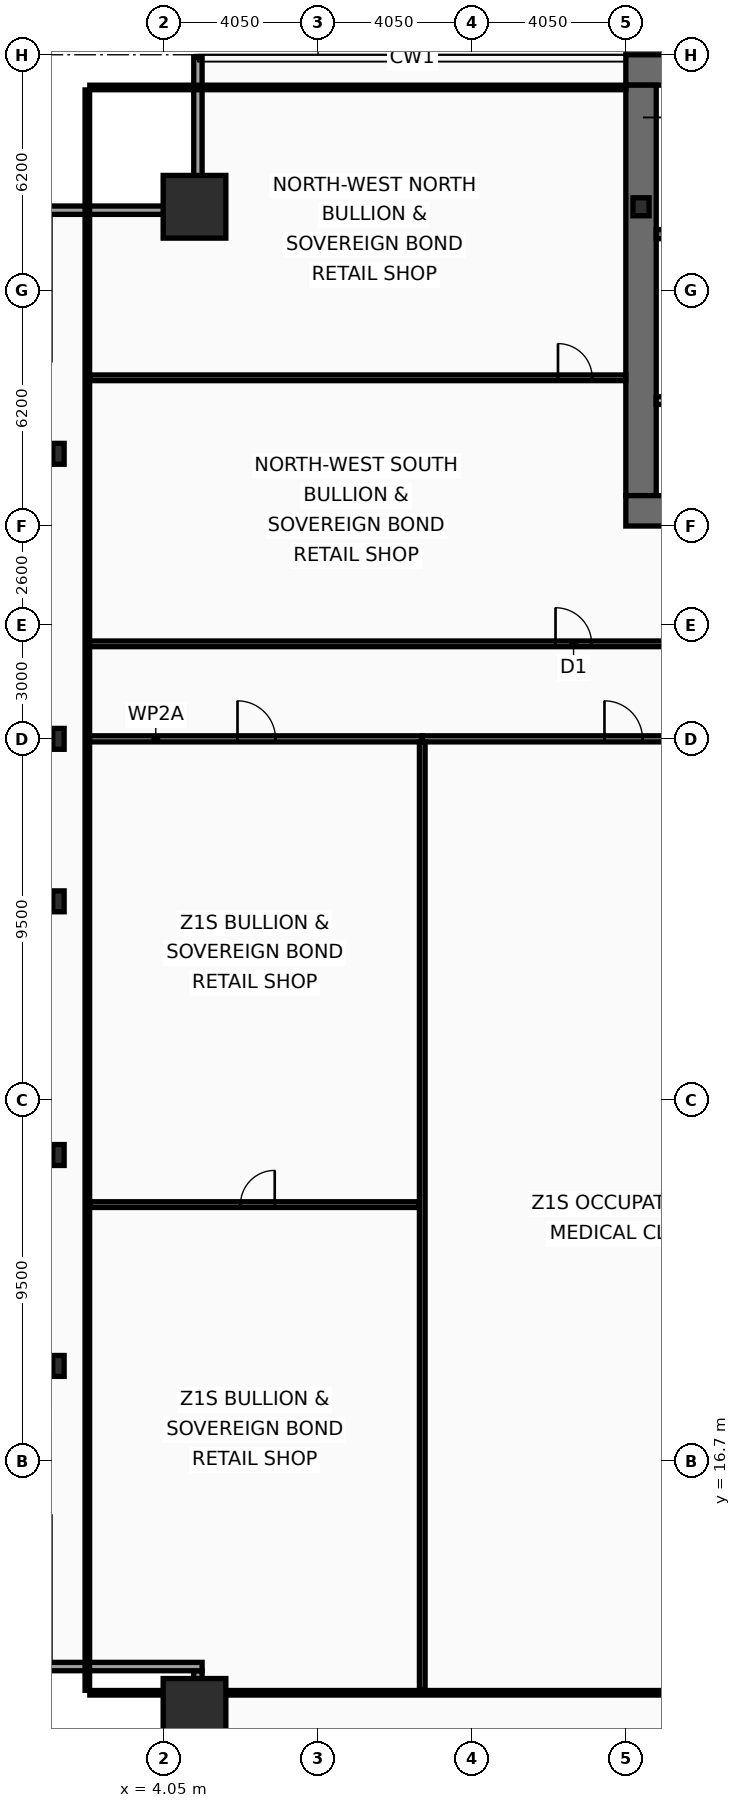
"""IFC4 building model, lengths in metres.
Left out: names, types, materials, properties, quantities, classifications, styles, units other than length and angle.
Written with IfcOpenShell. Run it as: python <this file> out.ifc"""

import sys

from ifc_helpers import new_model, si_unit, direction, frame, frame_2d, origin, origin_2d, place, context, subcontext, project, spatial, rectangle, hollow_rectangle, i_section, extrude, element, fill, save


model = new_model("IFC4")
c1 = context("Model", 3, precision=1e-05, world=origin(), true_north=direction((0.0, 1.0)))
c2 = subcontext(c1, "Body", "Model", "MODEL_VIEW")
j1 = project(units=[si_unit("LENGTHUNIT", "METRE"), si_unit("PLANEANGLEUNIT", "RADIAN")], contexts=[c1])
p1 = place(None, origin())
s1 = spatial("IfcSite", under=j1, at=p1, CompositionType="ELEMENT")
p2 = place(p1, origin())
s2 = spatial("IfcBuilding", under=s1, at=p2, CompositionType="ELEMENT")
p3 = place(p2, frame((0.0, 0.0, 61.8)))
s3 = spatial("IfcBuildingStorey", under=s2, at=p3, CompositionType="ELEMENT", Elevation=61.8)
p4 = place(p3, frame((16.2, 53.3, 0.0), z_axis=(0.0, 0.0, 1.0), x_axis=(1.0, 0.0, 0.0)))
e1 = element("IfcWall", 1, at=p4, inside=s3, PredefinedType="SHEAR", context=c2, shape_type="SweptSolid", body=[
    extrude(rectangle(XDim=40.5, YDim=0.8, at=frame_2d((20.25, 0.0))), origin(), (0.0, 0.0, 1.0), 3.82),
])
p5 = place(p3, frame((16.6, 42.1, 0.0), z_axis=(0.0, 0.0, 1.0), x_axis=(0.0, 1.0, 0.0)))
e2 = element("IfcWall", 2, at=p5, inside=s3, PredefinedType="SHEAR", context=c2, shape_type="SweptSolid", body=[
    extrude(rectangle(XDim=10.8, YDim=0.8, at=frame_2d((5.4, 0.0))), origin(), (0.0, 0.0, 1.0), 3.82),
])
p6 = place(p3, frame((18.65, 41.7, 0.0), z_axis=(0.0, 0.0, 1.0), x_axis=(-1.0, 0.0, 0.0)))
e3 = element("IfcWall", 3, at=p6, inside=s3, PredefinedType="SHEAR", context=c2, shape_type="SweptSolid", body=[
    extrude(rectangle(XDim=2.45, YDim=0.8, at=frame_2d((1.225, 0.0))), origin(), (0.0, 0.0, 1.0), 3.82),
])
p7 = place(p3, frame((17.0, 48.98, 0.0), z_axis=(0.0, 0.0, 1.0), x_axis=(1.0, 0.0, 0.0)))
e4 = element("IfcWall", 4, at=p7, inside=s3, PredefinedType="SHEAR", context=c2, shape_type="SweptSolid", body=[
    extrude(rectangle(XDim=7.22, YDim=0.24, at=frame_2d((3.61, 0.0))), origin(), (0.0, 0.0, 1.0), 3.82),
])
p8 = place(p7, frame((0.22, 0.0, 0.0)))
e5 = element("IfcOpeningElement", 5, at=p8, cuts=e4, PredefinedType="OPENING", context=c2, shape_type="SweptSolid", body=[
    extrude(rectangle(XDim=1.05, YDim=2.15, at=frame_2d((0.525, 1.075))), frame((0.0, 0.13, 0.0), z_axis=(0.0, -1.0, 0.0), x_axis=(1.0, 0.0, 0.0)), (0.0, 0.0, 1.0), 0.26),
])
for number, where, z_axis, x_axis in (
    (6, (4.85, 10.15, 0.0), (0.0, 0.0, 1.0), (1.0, 0.0, 0.0)),
    (7, (4.85, 49.7, 0.0), (0.0, 0.0, 1.0), (1.0, 0.0, 0.0)),
):
    element("IfcColumn", number, at=place(p3, frame(where, z_axis=z_axis, x_axis=x_axis)), inside=s3, PredefinedType="COLUMN", context=c2, shape_type="SweptSolid", body=[
        extrude(hollow_rectangle(XDim=1.65, YDim=1.65, WallThickness=0.075, at=origin_2d()), origin(), (0.0, 0.0, 1.0), 4.0),
    ])
for number, where, z_axis, x_axis in (
    (8, (1.27, 19.2, 0.0), (0.0, 0.0, 1.0), (1.0, 0.0, 0.0)),
    (9, (1.27, 24.75, 0.0), (0.0, 0.0, 1.0), (1.0, 0.0, 0.0)),
    (10, (1.27, 31.425, 0.0), (0.0, 0.0, 1.0), (1.0, 0.0, 0.0)),
    (11, (1.27, 35.7, 0.0), (0.0, 0.0, 1.0), (1.0, 0.0, 0.0)),
    (12, (1.27, 43.2, 0.0), (0.0, 0.0, 1.0), (1.0, 0.0, 0.0)),
):
    element("IfcColumn", number, at=place(p3, frame(where, z_axis=z_axis, x_axis=x_axis)), inside=s3, PredefinedType="COLUMN", context=c2, shape_type="SweptSolid", body=[
        extrude(i_section(OverallWidth=0.3, OverallDepth=0.55, WebThickness=0.015, FlangeThickness=0.029, at=origin_2d()), origin(), (0.0, 0.0, 1.0), 4.0),
    ])
p9 = place(p3, frame((16.6, 49.7, 0.0), z_axis=(0.0, 0.0, 1.0), x_axis=(1.0, 0.0, 0.0)))
e13 = element("IfcColumn", 13, at=p9, inside=s3, PredefinedType="COLUMN", context=c2, shape_type="SweptSolid", body=[
    extrude(i_section(OverallWidth=0.424, OverallDepth=0.474, WebThickness=0.048, FlangeThickness=0.077, at=origin_2d()), origin(), (0.0, 0.0, 1.0), 4.0),
])
p10 = place(p3, frame((4.94, 7.27, 0.0), z_axis=(0.0, 0.0, 1.0), x_axis=(0.0, 1.0, 0.0)))
e14 = element("IfcWall", 14, at=p10, inside=s3, PredefinedType="SOLIDWALL", context=c2, shape_type="SweptSolid", body=[
    extrude(rectangle(XDim=3.91, YDim=0.22, at=frame_2d((1.955, 0.0))), origin(), (0.0, 0.0, 1.0), 3.16),
])
for number, where, z_axis, x_axis in (
    (15, (5.05, 11.29, 0.0), (0.0, 0.0, 1.0), (-1.0, 0.0, 0.0)),
    (16, (0.83, 49.61, 0.0), (0.0, 0.0, 1.0), (1.0, 0.0, 0.0)),
):
    element("IfcWall", number, at=place(p3, frame(where, z_axis=z_axis, x_axis=x_axis)), inside=s3, PredefinedType="SOLIDWALL", context=c2, shape_type="SweptSolid", body=[
        extrude(rectangle(XDim=4.22, YDim=0.22, at=frame_2d((2.11, 0.0))), origin(), (0.0, 0.0, 1.0), 3.16),
    ])
p11 = place(p3, frame((4.94, 49.72, 0.0), z_axis=(0.0, 0.0, 1.0), x_axis=(0.0, 1.0, 0.0)))
e17 = element("IfcWall", 17, at=p11, inside=s3, PredefinedType="SOLIDWALL", context=c2, shape_type="SweptSolid", body=[
    extrude(rectangle(XDim=3.91, YDim=0.22, at=frame_2d((1.955, 0.0))), origin(), (0.0, 0.0, 1.0), 3.16),
])
p12 = place(p3, frame((17.0, 44.6, 0.0), z_axis=(0.0, 0.0, 1.0), x_axis=(1.0, 0.0, 0.0)))
e18 = element("IfcWall", 18, at=p12, inside=s3, PredefinedType="PARTITIONING", context=c2, shape_type="SweptSolid", body=[
    extrude(rectangle(XDim=4.0, YDim=0.2, at=frame_2d((2.0, 0.0))), origin(), (0.0, 0.0, 1.0), 3.82),
])
p13 = place(p12, frame((1.25, 0.0, 0.0)))
e19 = element("IfcOpeningElement", 19, at=p13, cuts=e18, PredefinedType="OPENING", context=c2, shape_type="SweptSolid", body=[
    extrude(rectangle(XDim=1.05, YDim=2.15, at=frame_2d((0.525, 1.075))), frame((0.0, 0.11, 0.0), z_axis=(0.0, -1.0, 0.0), x_axis=(1.0, 0.0, 0.0)), (0.0, 0.0, 1.0), 0.22),
])
p14 = place(p3, frame((2.03, 38.2, 0.0), z_axis=(0.0, 0.0, 1.0), x_axis=(1.0, 0.0, 0.0)))
e20 = element("IfcWall", 20, at=p14, inside=s3, PredefinedType="PARTITIONING", context=c2, shape_type="SweptSolid", body=[
    extrude(rectangle(XDim=16.52, YDim=0.15, at=frame_2d((8.26, 0.0))), origin(), (0.0, 0.0, 1.0), 3.01),
])
p15 = place(p14, frame((12.32, 0.0, 0.0)))
e21 = element("IfcOpeningElement", 21, at=p15, cuts=e20, PredefinedType="OPENING", context=c2, shape_type="SweptSolid", body=[
    extrude(rectangle(XDim=0.95, YDim=2.05, at=frame_2d((0.475, 1.025))), frame((0.0, 0.085, 0.0), z_axis=(0.0, -1.0, 0.0), x_axis=(1.0, 0.0, 0.0)), (0.0, 0.0, 1.0), 0.17),
])
p16 = place(p3, frame((2.095, 45.2, 0.0), z_axis=(0.0, 0.0, 1.0), x_axis=(1.0, 0.0, 0.0)))
e22 = element("IfcWall", 22, at=p16, inside=s3, PredefinedType="PARTITIONING", context=c2, shape_type="SweptSolid", body=[
    extrude(rectangle(XDim=14.105, YDim=0.15, at=frame_2d((7.052, 0.0))), origin(), (0.0, 0.0, 1.0), 3.16),
])
p17 = place(p16, frame((12.32, 0.0, 0.0)))
e23 = element("IfcOpeningElement", 23, at=p17, cuts=e22, PredefinedType="OPENING", context=c2, shape_type="SweptSolid", body=[
    extrude(rectangle(XDim=0.9, YDim=2.05, at=frame_2d((0.45, 1.025))), frame((0.0, 0.085, 0.0), z_axis=(0.0, -1.0, 0.0), x_axis=(1.0, 0.0, 0.0)), (0.0, 0.0, 1.0), 0.17),
])
p18 = place(p3, frame((2.03, 35.7, 0.0), z_axis=(0.0, 0.0, 1.0), x_axis=(1.0, 0.0, 0.0)))
e24 = element("IfcWall", 24, at=p18, inside=s3, PredefinedType="PARTITIONING", context=c2, shape_type="SweptSolid", body=[
    extrude(rectangle(XDim=8.813, YDim=0.16, at=frame_2d((4.407, 0.0))), origin(), (0.0, 0.0, 1.0), 3.01),
])
p19 = place(p18, frame((3.952, 0.0, 0.0)))
e25 = element("IfcOpeningElement", 25, at=p19, cuts=e24, PredefinedType="OPENING", context=c2, shape_type="SweptSolid", body=[
    extrude(rectangle(XDim=1.0, YDim=2.05, at=frame_2d((0.5, 1.025))), frame((0.0, 0.09, 0.0), z_axis=(0.0, -1.0, 0.0), x_axis=(1.0, 0.0, 0.0)), (0.0, 0.0, 1.0), 0.18),
])
p20 = place(p3, frame((2.095, 23.445, 0.0), z_axis=(0.0, 0.0, 1.0), x_axis=(1.0, 0.0, 0.0)))
e26 = element("IfcWall", 26, at=p20, inside=s3, PredefinedType="PARTITIONING", context=c2, shape_type="SweptSolid", body=[
    extrude(rectangle(XDim=8.668, YDim=0.15, at=frame_2d((4.334, 0.0))), origin(), (0.0, 0.0, 1.0), 3.82),
])
p21 = place(p20, frame((3.966, 0.0, 0.0)))
e27 = element("IfcOpeningElement", 27, at=p21, cuts=e26, PredefinedType="OPENING", context=c2, shape_type="SweptSolid", body=[
    extrude(rectangle(XDim=0.9, YDim=2.05, at=frame_2d((0.45, 1.025))), frame((0.0, 0.085, 0.0), z_axis=(0.0, -1.0, 0.0), x_axis=(1.0, 0.0, 0.0)), (0.0, 0.0, 1.0), 0.17),
])
p22 = place(p3, frame((10.844, 35.7, 0.0), z_axis=(0.0, 0.0, 1.0), x_axis=(1.0, 0.0, 0.0)))
e28 = element("IfcWall", 28, at=p22, inside=s3, PredefinedType="PARTITIONING", context=c2, shape_type="SweptSolid", body=[
    extrude(rectangle(XDim=10.82, YDim=0.16, at=frame_2d((5.41, 0.0))), origin(), (0.0, 0.0, 1.0), 3.01),
])
p23 = place(p22, frame((4.794, 0.0, 0.0)))
e29 = element("IfcOpeningElement", 29, at=p23, cuts=e28, PredefinedType="OPENING", context=c2, shape_type="SweptSolid", body=[
    extrude(rectangle(XDim=1.0, YDim=2.05, at=frame_2d((0.5, 1.025))), frame((0.0, 0.09, 0.0), z_axis=(0.0, -1.0, 0.0), x_axis=(1.0, 0.0, 0.0)), (0.0, 0.0, 1.0), 0.18),
])
p24 = place(p3, frame((10.844, 10.665, 0.0), z_axis=(0.0, 0.0, 1.0), x_axis=(0.0, 1.0, 0.0)))
e30 = element("IfcWall", 30, at=p24, inside=s3, PredefinedType="PARTITIONING", context=c2, shape_type="SweptSolid", body=[
    extrude(rectangle(XDim=24.95, YDim=0.15, at=frame_2d((12.475, 0.0))), origin(), (0.0, 0.0, 1.0), 3.01),
])
p25 = place(p3, frame((2.03, 10.665, 0.0), z_axis=(0.0, 0.0, 1.0), x_axis=(0.0, 1.0, 0.0)))
e31 = element("IfcWall", 31, at=p25, inside=s3, PredefinedType="PARTITIONING", context=c2, shape_type="SweptSolid", body=[
    extrude(rectangle(XDim=42.11, YDim=0.12, at=frame_2d((21.055, 0.0))), origin(), (0.0, 0.0, 1.0), 3.01),
])
p26 = place(p3, frame((2.095, 52.84, 0.0), z_axis=(0.0, 0.0, 1.0), x_axis=(1.0, 0.0, 0.0)))
e32 = element("IfcWall", 32, at=p26, inside=s3, PredefinedType="PARTITIONING", context=c2, shape_type="SweptSolid", body=[
    extrude(rectangle(XDim=14.105, YDim=0.12, at=frame_2d((7.052, 0.0))), origin(), (0.0, 0.0, 1.0), 3.82),
])
p27 = place(p3, frame((2.095, 10.6, 0.0), z_axis=(0.0, 0.0, 1.0), x_axis=(1.0, 0.0, 0.0)))
e33 = element("IfcWall", 33, at=p27, inside=s3, PredefinedType="PARTITIONING", context=c2, shape_type="SweptSolid", body=[
    extrude(rectangle(XDim=68.71, YDim=0.12, at=frame_2d((34.355, 0.0))), origin(), (0.0, 0.0, 1.0), 3.01),
])
p28 = place(p15, origin())
e34 = element("IfcDoor", 34, at=p28, inside=s3, OperationType="SINGLE_SWING_LEFT", PredefinedType="DOOR", context=c2, shape_type="SweptSolid", body=[
    extrude(rectangle(XDim=0.95, YDim=2.05, at=frame_2d((0.475, 1.025))), frame((0.0, 0.025, 0.0), z_axis=(0.0, -1.0, 0.0), x_axis=(1.0, 0.0, 0.0)), (0.0, 0.0, 1.0), 0.05),
])
fill(e21, e34)
p29 = place(p17, origin())
e35 = element("IfcDoor", 35, at=p29, inside=s3, OperationType="SINGLE_SWING_LEFT", PredefinedType="DOOR", context=c2, shape_type="SweptSolid", body=[
    extrude(rectangle(XDim=0.9, YDim=2.05, at=frame_2d((0.45, 1.025))), frame((0.0, 0.025, 0.0), z_axis=(0.0, -1.0, 0.0), x_axis=(1.0, 0.0, 0.0)), (0.0, 0.0, 1.0), 0.05),
])
fill(e23, e35)
p30 = place(p19, origin())
e36 = element("IfcDoor", 36, at=p30, inside=s3, OperationType="SINGLE_SWING_LEFT", PredefinedType="DOOR", context=c2, shape_type="SweptSolid", body=[
    extrude(rectangle(XDim=1.0, YDim=2.05, at=frame_2d((0.5, 1.025))), frame((0.0, 0.025, 0.0), z_axis=(0.0, -1.0, 0.0), x_axis=(1.0, 0.0, 0.0)), (0.0, 0.0, 1.0), 0.05),
])
fill(e25, e36)
p31 = place(p21, origin())
e37 = element("IfcDoor", 37, at=p31, inside=s3, OperationType="SINGLE_SWING_RIGHT", PredefinedType="DOOR", context=c2, shape_type="SweptSolid", body=[
    extrude(rectangle(XDim=0.9, YDim=2.05, at=frame_2d((0.45, 1.025))), frame((0.0, 0.025, 0.0), z_axis=(0.0, -1.0, 0.0), x_axis=(1.0, 0.0, 0.0)), (0.0, 0.0, 1.0), 0.05),
])
fill(e27, e37)
p32 = place(p23, origin())
e38 = element("IfcDoor", 38, at=p32, inside=s3, OperationType="SINGLE_SWING_LEFT", PredefinedType="DOOR", context=c2, shape_type="SweptSolid", body=[
    extrude(rectangle(XDim=1.0, YDim=2.05, at=frame_2d((0.5, 1.025))), frame((0.0, 0.025, 0.0), z_axis=(0.0, -1.0, 0.0), x_axis=(1.0, 0.0, 0.0)), (0.0, 0.0, 1.0), 0.05),
])
fill(e29, e38)
save(model, sys.argv[1])
